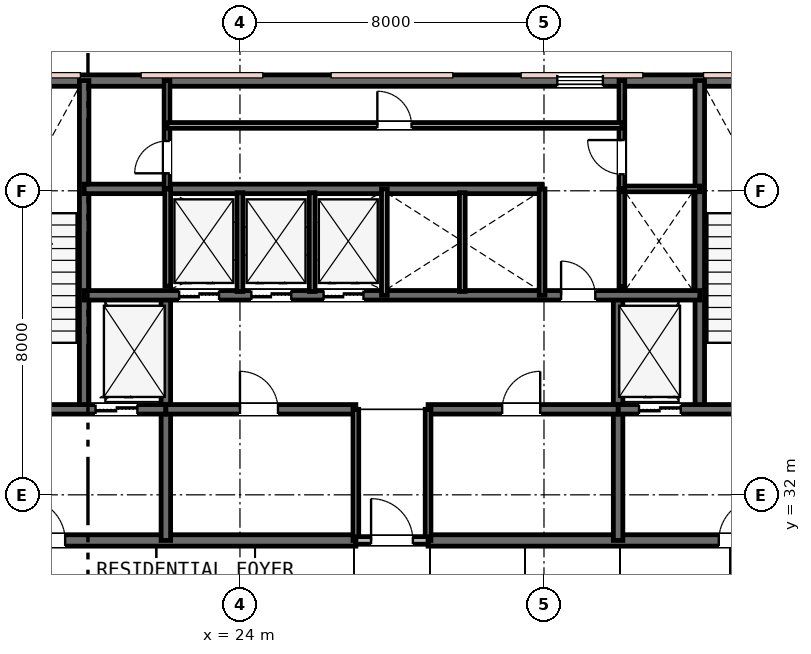
"""IFC4 building model, lengths in metres.
Left out: names, types, materials, properties, quantities, classifications, styles, units other than length and angle.
Written with IfcOpenShell. Run it as: python <this file> out.ifc"""

import sys

from ifc_helpers import new_model, si_unit, direction, frame, frame_2d, origin, place, context, subcontext, project, spatial, rectangle, extrude, element, fill, save


model = new_model("IFC4")
c1 = context("Model", 3, precision=1e-05, world=origin(), true_north=direction((0.0, 1.0)))
c2 = subcontext(c1, "Body", "Model", "MODEL_VIEW")
j1 = project(units=[si_unit("LENGTHUNIT", "METRE"), si_unit("PLANEANGLEUNIT", "RADIAN")], contexts=[c1])
p1 = place(None, origin())
s1 = spatial("IfcSite", under=j1, at=p1, CompositionType="ELEMENT")
p2 = place(p1, origin())
s2 = spatial("IfcBuilding", under=s1, at=p2, CompositionType="ELEMENT")
p3 = place(p2, frame((0.0, 0.0, 267.8)))
s3 = spatial("IfcBuildingStorey", under=s2, at=p3, CompositionType="ELEMENT", Elevation=267.8)
p4 = place(p3, frame((15.85, 42.9, 0.0), z_axis=(0.0, 0.0, 1.0), x_axis=(1.0, 0.0, 0.0)))
e1 = element("IfcWall", 1, at=p4, inside=s3, PredefinedType="SHEAR", context=c2, shape_type="SweptSolid", body=[
    extrude(rectangle(XDim=24.3, YDim=0.3, at=frame_2d((12.15, 0.0))), origin(), (0.0, 0.0, 1.0), 3.8),
])
p5 = place(p4, frame((1.6, 0.0, 0.95)))
e2 = element("IfcOpeningElement", 2, at=p5, cuts=e1, PredefinedType="OPENING", context=c2, shape_type="SweptSolid", body=[
    extrude(rectangle(XDim=1.2, YDim=1.6, at=frame_2d((0.6, 0.8))), frame((0.0, 0.16, 0.0), z_axis=(0.0, -1.0, 0.0), x_axis=(1.0, 0.0, 0.0)), (0.0, 0.0, 1.0), 0.32),
])
p6 = place(p4, frame((16.5, 0.0, 0.95)))
e3 = element("IfcOpeningElement", 3, at=p6, cuts=e1, PredefinedType="OPENING", context=c2, shape_type="SweptSolid", body=[
    extrude(rectangle(XDim=1.2, YDim=1.6, at=frame_2d((0.6, 0.8))), frame((0.0, 0.16, 0.0), z_axis=(0.0, -1.0, 0.0), x_axis=(1.0, 0.0, 0.0)), (0.0, 0.0, 1.0), 0.32),
])
p7 = place(p4, frame((21.6, 0.0, 0.95)))
e4 = element("IfcOpeningElement", 4, at=p7, cuts=e1, PredefinedType="OPENING", context=c2, shape_type="SweptSolid", body=[
    extrude(rectangle(XDim=1.2, YDim=1.6, at=frame_2d((0.6, 0.8))), frame((0.0, 0.16, 0.0), z_axis=(0.0, -1.0, 0.0), x_axis=(1.0, 0.0, 0.0)), (0.0, 0.0, 1.0), 0.32),
])
p8 = place(p3, frame((15.85, 30.8, 0.0), z_axis=(0.0, 0.0, 1.0), x_axis=(1.0, 0.0, 0.0)))
e5 = element("IfcWall", 5, at=p8, inside=s3, PredefinedType="SHEAR", context=c2, shape_type="SweptSolid", body=[
    extrude(rectangle(XDim=11.2, YDim=0.3, at=frame_2d((5.6, 0.0))), origin(), (0.0, 0.0, 1.0), 3.8),
])
p9 = place(p8, frame((2.45, 0.0, 0.0)))
e6 = element("IfcOpeningElement", 6, at=p9, cuts=e5, PredefinedType="OPENING", context=c2, shape_type="SweptSolid", body=[
    extrude(rectangle(XDim=1.1, YDim=2.15, at=frame_2d((0.55, 1.075))), frame((0.0, 0.16, 0.0), z_axis=(0.0, -1.0, 0.0), x_axis=(1.0, 0.0, 0.0)), (0.0, 0.0, 1.0), 0.32),
])
p10 = place(p3, frame((28.95, 30.8, 0.0), z_axis=(0.0, 0.0, 1.0), x_axis=(1.0, 0.0, 0.0)))
e7 = element("IfcWall", 7, at=p10, inside=s3, PredefinedType="SHEAR", context=c2, shape_type="SweptSolid", body=[
    extrude(rectangle(XDim=11.2, YDim=0.3, at=frame_2d((5.6, 0.0))), origin(), (0.0, 0.0, 1.0), 3.8),
])
p11 = place(p10, frame((7.65, 0.0, 0.0)))
e8 = element("IfcOpeningElement", 8, at=p11, cuts=e7, PredefinedType="OPENING", context=c2, shape_type="SweptSolid", body=[
    extrude(rectangle(XDim=1.1, YDim=2.15, at=frame_2d((0.55, 1.075))), frame((0.0, 0.16, 0.0), z_axis=(0.0, -1.0, 0.0), x_axis=(1.0, 0.0, 0.0)), (0.0, 0.0, 1.0), 0.32),
])
for number, where, z_axis, x_axis in (
    (9, (19.9, 34.25, 0.0), (0.0, 0.0, 1.0), (0.0, 1.0, 0.0)),
    (10, (36.1, 34.25, 0.0), (0.0, 0.0, 1.0), (0.0, 1.0, 0.0)),
):
    element("IfcWall", number, at=place(p3, frame(where, z_axis=z_axis, x_axis=x_axis)), inside=s3, PredefinedType="SHEAR", context=c2, shape_type="SweptSolid", body=[
        extrude(rectangle(XDim=8.65, YDim=0.25, at=frame_2d((4.325, 0.0))), origin(), (0.0, 0.0, 1.0), 3.8),
    ])
for number, where, z_axis, x_axis in (
    (11, (22.05, 30.8, 0.0), (0.0, 0.0, 1.0), (0.0, 1.0, 0.0)),
    (12, (33.95, 30.8, 0.0), (0.0, 0.0, 1.0), (0.0, 1.0, 0.0)),
):
    element("IfcWall", number, at=place(p3, frame(where, z_axis=z_axis, x_axis=x_axis)), inside=s3, PredefinedType="SHEAR", context=c2, shape_type="SweptSolid", body=[
        extrude(rectangle(XDim=6.45, YDim=0.25, at=frame_2d((3.225, 0.0))), origin(), (0.0, 0.0, 1.0), 3.8),
    ])
p12 = place(p3, frame((16.0, 34.25, 0.0), z_axis=(0.0, 0.0, 1.0), x_axis=(1.0, 0.0, 0.0)))
e13 = element("IfcWall", 13, at=p12, inside=s3, PredefinedType="SHEAR", context=c2, shape_type="SweptSolid", body=[
    extrude(rectangle(XDim=6.05, YDim=0.25, at=frame_2d((3.025, 0.0))), origin(), (0.0, 0.0, 1.0), 3.8),
])
p13 = place(p12, frame((1.25, 0.0, 0.0)))
e14 = element("IfcOpeningElement", 14, at=p13, cuts=e13, PredefinedType="OPENING", context=c2, shape_type="SweptSolid", body=[
    extrude(rectangle(XDim=1.0, YDim=2.15, at=frame_2d((0.5, 1.075))), frame((0.0, 0.135, 0.0), z_axis=(0.0, -1.0, 0.0), x_axis=(1.0, 0.0, 0.0)), (0.0, 0.0, 1.0), 0.27),
])
p14 = place(p12, frame((4.2, 0.0, 0.0)))
e15 = element("IfcOpeningElement", 15, at=p14, cuts=e13, PredefinedType="OPENING", context=c2, shape_type="SweptSolid", body=[
    extrude(rectangle(XDim=1.1, YDim=2.15, at=frame_2d((0.55, 1.075))), frame((0.0, 0.135, 0.0), z_axis=(0.0, -1.0, 0.0), x_axis=(1.0, 0.0, 0.0)), (0.0, 0.0, 1.0), 0.27),
])
p15 = place(p3, frame((33.95, 34.25, 0.0), z_axis=(0.0, 0.0, 1.0), x_axis=(1.0, 0.0, 0.0)))
e16 = element("IfcWall", 16, at=p15, inside=s3, PredefinedType="SHEAR", context=c2, shape_type="SweptSolid", body=[
    extrude(rectangle(XDim=6.05, YDim=0.25, at=frame_2d((3.025, 0.0))), origin(), (0.0, 0.0, 1.0), 3.8),
])
p16 = place(p15, frame((3.7, 0.0, 0.0)))
e17 = element("IfcOpeningElement", 17, at=p16, cuts=e16, PredefinedType="OPENING", context=c2, shape_type="SweptSolid", body=[
    extrude(rectangle(XDim=1.0, YDim=2.15, at=frame_2d((0.5, 1.075))), frame((0.0, 0.135, 0.0), z_axis=(0.0, -1.0, 0.0), x_axis=(1.0, 0.0, 0.0)), (0.0, 0.0, 1.0), 0.27),
])
p17 = place(p15, frame((0.55, 0.0, 0.0)))
e18 = element("IfcOpeningElement", 18, at=p17, cuts=e16, PredefinedType="OPENING", context=c2, shape_type="SweptSolid", body=[
    extrude(rectangle(XDim=1.1, YDim=2.15, at=frame_2d((0.55, 1.075))), frame((0.0, 0.135, 0.0), z_axis=(0.0, -1.0, 0.0), x_axis=(1.0, 0.0, 0.0)), (0.0, 0.0, 1.0), 0.27),
])
p18 = place(p3, frame((22.05, 34.25, 0.0), z_axis=(0.0, 0.0, 1.0), x_axis=(1.0, 0.0, 0.0)))
e19 = element("IfcWall", 19, at=p18, inside=s3, PredefinedType="SHEAR", context=c2, shape_type="SweptSolid", body=[
    extrude(rectangle(XDim=5.0, YDim=0.25, at=frame_2d((2.5, 0.0))), origin(), (0.0, 0.0, 1.0), 3.8),
])
p19 = place(p18, frame((1.95, 0.0, 0.0)))
e20 = element("IfcOpeningElement", 20, at=p19, cuts=e19, PredefinedType="OPENING", context=c2, shape_type="SweptSolid", body=[
    extrude(rectangle(XDim=1.0, YDim=2.15, at=frame_2d((0.5, 1.075))), frame((0.0, 0.135, 0.0), z_axis=(0.0, -1.0, 0.0), x_axis=(1.0, 0.0, 0.0)), (0.0, 0.0, 1.0), 0.27),
])
p20 = place(p3, frame((28.95, 34.25, 0.0), z_axis=(0.0, 0.0, 1.0), x_axis=(1.0, 0.0, 0.0)))
e21 = element("IfcWall", 21, at=p20, inside=s3, PredefinedType="SHEAR", context=c2, shape_type="SweptSolid", body=[
    extrude(rectangle(XDim=5.0, YDim=0.25, at=frame_2d((2.5, 0.0))), origin(), (0.0, 0.0, 1.0), 3.8),
])
p21 = place(p20, frame((1.95, 0.0, 0.0)))
e22 = element("IfcOpeningElement", 22, at=p21, cuts=e21, PredefinedType="OPENING", context=c2, shape_type="SweptSolid", body=[
    extrude(rectangle(XDim=1.0, YDim=2.15, at=frame_2d((0.5, 1.075))), frame((0.0, 0.135, 0.0), z_axis=(0.0, -1.0, 0.0), x_axis=(1.0, 0.0, 0.0)), (0.0, 0.0, 1.0), 0.27),
])
p22 = place(p3, frame((19.9, 37.25, 0.0), z_axis=(0.0, 0.0, 1.0), x_axis=(1.0, 0.0, 0.0)))
e23 = element("IfcWall", 23, at=p22, inside=s3, PredefinedType="SHEAR", context=c2, shape_type="SweptSolid", body=[
    extrude(rectangle(XDim=16.2, YDim=0.25, at=frame_2d((8.1, 0.0))), origin(), (0.0, 0.0, 1.0), 3.8),
])
p23 = place(p22, frame((12.55, 0.0, 0.0)))
e24 = element("IfcOpeningElement", 24, at=p23, cuts=e23, PredefinedType="OPENING", context=c2, shape_type="SweptSolid", body=[
    extrude(rectangle(XDim=0.9, YDim=2.15, at=frame_2d((0.45, 1.075))), frame((0.0, 0.135, 0.0), z_axis=(0.0, -1.0, 0.0), x_axis=(1.0, 0.0, 0.0)), (0.0, 0.0, 1.0), 0.27),
])
p24 = place(p22, frame((2.5, 0.0, 0.0)))
e25 = element("IfcOpeningElement", 25, at=p24, cuts=e23, PredefinedType="OPENING", context=c2, shape_type="SweptSolid", body=[
    extrude(rectangle(XDim=1.05, YDim=2.15, at=frame_2d((0.525, 1.075))), frame((0.0, 0.135, 0.0), z_axis=(0.0, -1.0, 0.0), x_axis=(1.0, 0.0, 0.0)), (0.0, 0.0, 1.0), 0.27),
])
p25 = place(p22, frame((4.4, 0.0, 0.0)))
e26 = element("IfcOpeningElement", 26, at=p25, cuts=e23, PredefinedType="OPENING", context=c2, shape_type="SweptSolid", body=[
    extrude(rectangle(XDim=1.05, YDim=2.15, at=frame_2d((0.525, 1.075))), frame((0.0, 0.135, 0.0), z_axis=(0.0, -1.0, 0.0), x_axis=(1.0, 0.0, 0.0)), (0.0, 0.0, 1.0), 0.27),
])
p26 = place(p22, frame((6.3, 0.0, 0.0)))
e27 = element("IfcOpeningElement", 27, at=p26, cuts=e23, PredefinedType="OPENING", context=c2, shape_type="SweptSolid", body=[
    extrude(rectangle(XDim=1.05, YDim=2.15, at=frame_2d((0.525, 1.075))), frame((0.0, 0.135, 0.0), z_axis=(0.0, -1.0, 0.0), x_axis=(1.0, 0.0, 0.0)), (0.0, 0.0, 1.0), 0.27),
])
p27 = place(p3, frame((19.9, 40.05, 0.0), z_axis=(0.0, 0.0, 1.0), x_axis=(1.0, 0.0, 0.0)))
e28 = element("IfcWall", 28, at=p27, inside=s3, PredefinedType="SHEAR", context=c2, shape_type="SweptSolid", body=[
    extrude(rectangle(XDim=12.05, YDim=0.25, at=frame_2d((6.025, 0.0))), origin(), (0.0, 0.0, 1.0), 3.8),
])
for number, where, z_axis, x_axis in (
    (29, (27.05, 30.8, 0.0), (0.0, 0.0, 1.0), (0.0, 1.0, 0.0)),
    (30, (28.95, 30.8, 0.0), (0.0, 0.0, 1.0), (0.0, 1.0, 0.0)),
):
    element("IfcWall", number, at=place(p3, frame(where, z_axis=z_axis, x_axis=x_axis)), inside=s3, PredefinedType="PLUMBINGWALL", context=c2, shape_type="SweptSolid", body=[
        extrude(rectangle(XDim=3.45, YDim=0.15, at=frame_2d((1.725, 0.0))), origin(), (0.0, 0.0, 1.0), 3.28),
    ])
p28 = place(p3, frame((27.05, 30.8, 0.0), z_axis=(0.0, 0.0, 1.0), x_axis=(1.0, 0.0, 0.0)))
e31 = element("IfcWall", 31, at=p28, inside=s3, PredefinedType="PARTITIONING", context=c2, shape_type="SweptSolid", body=[
    extrude(rectangle(XDim=1.9, YDim=0.2, at=frame_2d((0.95, 0.0))), origin(), (0.0, 0.0, 1.0), 3.28),
])
p29 = place(p28, frame((0.4, 0.0, 0.0)))
e32 = element("IfcOpeningElement", 32, at=p29, cuts=e31, PredefinedType="OPENING", context=c2, shape_type="SweptSolid", body=[
    extrude(rectangle(XDim=1.1, YDim=2.15, at=frame_2d((0.55, 1.075))), frame((0.0, 0.11, 0.0), z_axis=(0.0, -1.0, 0.0), x_axis=(1.0, 0.0, 0.0)), (0.0, 0.0, 1.0), 0.22),
])
p30 = place(p3, frame((22.1, 37.49, 0.0), z_axis=(0.0, 0.0, 1.0), x_axis=(0.0, 1.0, 0.0)))
e33 = element("IfcWall", 33, at=p30, inside=s3, PredefinedType="PLUMBINGWALL", context=c2, shape_type="SweptSolid", body=[
    extrude(rectangle(XDim=2.56, YDim=0.15, at=frame_2d((1.28, 0.0))), origin(), (0.0, 0.0, 1.0), 3.53),
])
p31 = place(p3, frame((27.8, 37.25, 0.0), z_axis=(0.0, 0.0, 1.0), x_axis=(0.0, 1.0, 0.0)))
e34 = element("IfcWall", 34, at=p31, inside=s3, PredefinedType="PLUMBINGWALL", context=c2, shape_type="SweptSolid", body=[
    extrude(rectangle(XDim=2.8, YDim=0.15, at=frame_2d((1.4, 0.0))), origin(), (0.0, 0.0, 1.0), 3.53),
])
for number, where, z_axis, x_axis in (
    (35, (24.0, 37.35, 0.0), (0.0, 0.0, 1.0), (0.0, 1.0, 0.0)),
    (36, (25.9, 37.35, 0.0), (0.0, 0.0, 1.0), (0.0, 1.0, 0.0)),
):
    element("IfcWall", number, at=place(p3, frame(where, z_axis=z_axis, x_axis=x_axis)), inside=s3, PredefinedType="PLUMBINGWALL", context=c2, shape_type="SweptSolid", body=[
        extrude(rectangle(XDim=2.6, YDim=0.15, at=frame_2d((1.3, 0.0))), origin(), (0.0, 0.0, 1.0), 3.53),
    ])
p32 = place(p3, frame((31.95, 37.25, 0.0), z_axis=(0.0, 0.0, 1.0), x_axis=(0.0, 1.0, 0.0)))
e37 = element("IfcWall", 37, at=p32, inside=s3, PredefinedType="PLUMBINGWALL", context=c2, shape_type="SweptSolid", body=[
    extrude(rectangle(XDim=2.8, YDim=0.15, at=frame_2d((1.4, 0.0))), origin(), (0.0, 0.0, 1.0), 3.53),
])
p33 = place(p3, frame((29.85, 37.35, 0.0), z_axis=(0.0, 0.0, 1.0), x_axis=(0.0, 1.0, 0.0)))
e38 = element("IfcWall", 38, at=p33, inside=s3, PredefinedType="PLUMBINGWALL", context=c2, shape_type="SweptSolid", body=[
    extrude(rectangle(XDim=2.6, YDim=0.15, at=frame_2d((1.3, 0.0))), origin(), (0.0, 0.0, 1.0), 3.53),
])
p34 = place(p3, frame((34.05, 37.473, 0.0), z_axis=(0.0, 0.0, 1.0), x_axis=(0.0, 1.0, 0.0)))
e39 = element("IfcWall", 39, at=p34, inside=s3, PredefinedType="PLUMBINGWALL", context=c2, shape_type="SweptSolid", body=[
    extrude(rectangle(XDim=2.577, YDim=0.15, at=frame_2d((1.288, 0.0))), origin(), (0.0, 0.0, 1.0), 3.53),
])
p35 = place(p3, frame((34.05, 40.05, 0.0), z_axis=(0.0, 0.0, 1.0), x_axis=(1.0, 0.0, 0.0)))
e40 = element("IfcWall", 40, at=p35, inside=s3, PredefinedType="PARTITIONING", context=c2, shape_type="SweptSolid", body=[
    extrude(rectangle(XDim=2.05, YDim=0.15, at=frame_2d((1.025, 0.0))), origin(), (0.0, 0.0, 1.0), 3.53),
])
p36 = place(p3, frame((34.05, 40.05, 0.0), z_axis=(0.0, 0.0, 1.0), x_axis=(0.0, 1.0, 0.0)))
e41 = element("IfcWall", 41, at=p36, inside=s3, PredefinedType="PARTITIONING", context=c2, shape_type="SweptSolid", body=[
    extrude(rectangle(XDim=2.85, YDim=0.15, at=frame_2d((1.425, 0.0))), origin(), (0.0, 0.0, 1.0), 3.53),
])
p37 = place(p36, frame((0.385, 0.0, 0.0)))
e42 = element("IfcOpeningElement", 42, at=p37, cuts=e41, PredefinedType="OPENING", context=c2, shape_type="SweptSolid", body=[
    extrude(rectangle(XDim=0.9, YDim=2.15, at=frame_2d((0.45, 1.075))), frame((0.0, 0.085, 0.0), z_axis=(0.0, -1.0, 0.0), x_axis=(1.0, 0.0, 0.0)), (0.0, 0.0, 1.0), 0.17),
])
p38 = place(p3, frame((22.08, 40.05, 0.0), z_axis=(0.0, 0.0, 1.0), x_axis=(0.0, 1.0, 0.0)))
e43 = element("IfcWall", 43, at=p38, inside=s3, PredefinedType="PARTITIONING", context=c2, shape_type="SweptSolid", body=[
    extrude(rectangle(XDim=2.85, YDim=0.15, at=frame_2d((1.425, 0.0))), origin(), (0.0, 0.0, 1.0), 3.53),
])
p39 = place(p38, frame((0.41, 0.0, 0.0)))
e44 = element("IfcOpeningElement", 44, at=p39, cuts=e43, PredefinedType="OPENING", context=c2, shape_type="SweptSolid", body=[
    extrude(rectangle(XDim=0.85, YDim=2.15, at=frame_2d((0.425, 1.075))), frame((0.0, 0.085, 0.0), z_axis=(0.0, -1.0, 0.0), x_axis=(1.0, 0.0, 0.0)), (0.0, 0.0, 1.0), 0.17),
])
p40 = place(p3, frame((22.08, 41.72, 0.0), z_axis=(0.0, 0.0, 1.0), x_axis=(1.0, 0.0, 0.0)))
e45 = element("IfcWall", 45, at=p40, inside=s3, PredefinedType="PARTITIONING", context=c2, shape_type="SweptSolid", body=[
    extrude(rectangle(XDim=11.97, YDim=0.15, at=frame_2d((5.985, 0.0))), origin(), (0.0, 0.0, 1.0), 3.53),
])
p41 = place(p40, frame((5.535, 0.0, 0.0)))
e46 = element("IfcOpeningElement", 46, at=p41, cuts=e45, PredefinedType="OPENING", context=c2, shape_type="SweptSolid", body=[
    extrude(rectangle(XDim=0.9, YDim=2.15, at=frame_2d((0.45, 1.075))), frame((0.0, 0.085, 0.0), z_axis=(0.0, -1.0, 0.0), x_axis=(1.0, 0.0, 0.0)), (0.0, 0.0, 1.0), 0.17),
])
p42 = place(p6, origin())
e47 = element("IfcWindow", 47, at=p42, inside=s3, PartitioningType="SINGLE_PANEL", PredefinedType="WINDOW", context=c2, shape_type="SweptSolid", body=[
    extrude(rectangle(XDim=1.2, YDim=1.6, at=frame_2d((0.6, 0.8))), frame((0.0, 0.03, 0.0), z_axis=(0.0, -1.0, 0.0), x_axis=(1.0, 0.0, 0.0)), (0.0, 0.0, 1.0), 0.06),
])
fill(e3, e47)
p43 = place(p29, origin())
e48 = element("IfcDoor", 48, at=p43, inside=s3, OperationType="SINGLE_SWING_LEFT", PredefinedType="DOOR", context=c2, shape_type="SweptSolid", body=[
    extrude(rectangle(XDim=1.1, YDim=2.15, at=frame_2d((0.55, 1.075))), frame((0.0, 0.025, 0.0), z_axis=(0.0, -1.0, 0.0), x_axis=(1.0, 0.0, 0.0)), (0.0, 0.0, 1.0), 0.05),
])
fill(e32, e48)
p44 = place(p9, origin())
e49 = element("IfcDoor", 49, at=p44, inside=s3, OperationType="SINGLE_SWING_LEFT", PredefinedType="DOOR", context=c2, shape_type="SweptSolid", body=[
    extrude(rectangle(XDim=1.1, YDim=2.15, at=frame_2d((0.55, 1.075))), frame((0.0, 0.025, 0.0), z_axis=(0.0, -1.0, 0.0), x_axis=(1.0, 0.0, 0.0)), (0.0, 0.0, 1.0), 0.05),
])
fill(e6, e49)
p45 = place(p11, origin())
e50 = element("IfcDoor", 50, at=p45, inside=s3, OperationType="SINGLE_SWING_RIGHT", PredefinedType="DOOR", context=c2, shape_type="SweptSolid", body=[
    extrude(rectangle(XDim=1.1, YDim=2.15, at=frame_2d((0.55, 1.075))), frame((0.0, 0.025, 0.0), z_axis=(0.0, -1.0, 0.0), x_axis=(1.0, 0.0, 0.0)), (0.0, 0.0, 1.0), 0.05),
])
fill(e8, e50)
p46 = place(p19, origin())
e51 = element("IfcDoor", 51, at=p46, inside=s3, OperationType="SINGLE_SWING_LEFT", PredefinedType="DOOR", context=c2, shape_type="SweptSolid", body=[
    extrude(rectangle(XDim=1.0, YDim=2.15, at=frame_2d((0.5, 1.075))), frame((0.0, 0.025, 0.0), z_axis=(0.0, -1.0, 0.0), x_axis=(1.0, 0.0, 0.0)), (0.0, 0.0, 1.0), 0.05),
])
fill(e20, e51)
p47 = place(p21, origin())
e52 = element("IfcDoor", 52, at=p47, inside=s3, OperationType="SINGLE_SWING_RIGHT", PredefinedType="DOOR", context=c2, shape_type="SweptSolid", body=[
    extrude(rectangle(XDim=1.0, YDim=2.15, at=frame_2d((0.5, 1.075))), frame((0.0, 0.025, 0.0), z_axis=(0.0, -1.0, 0.0), x_axis=(1.0, 0.0, 0.0)), (0.0, 0.0, 1.0), 0.05),
])
fill(e22, e52)
p48 = place(p23, origin())
e53 = element("IfcDoor", 53, at=p48, inside=s3, OperationType="SINGLE_SWING_LEFT", PredefinedType="DOOR", context=c2, shape_type="SweptSolid", body=[
    extrude(rectangle(XDim=0.9, YDim=2.15, at=frame_2d((0.45, 1.075))), frame((0.0, 0.025, 0.0), z_axis=(0.0, -1.0, 0.0), x_axis=(1.0, 0.0, 0.0)), (0.0, 0.0, 1.0), 0.05),
])
fill(e24, e53)
p49 = place(p37, origin())
e54 = element("IfcDoor", 54, at=p49, inside=s3, OperationType="SINGLE_SWING_RIGHT", PredefinedType="DOOR", context=c2, shape_type="SweptSolid", body=[
    extrude(rectangle(XDim=0.9, YDim=2.15, at=frame_2d((0.45, 1.075))), frame((0.0, 0.025, 0.0), z_axis=(0.0, -1.0, 0.0), x_axis=(1.0, 0.0, 0.0)), (0.0, 0.0, 1.0), 0.05),
])
fill(e42, e54)
p50 = place(p39, origin())
e55 = element("IfcDoor", 55, at=p50, inside=s3, OperationType="SINGLE_SWING_LEFT", PredefinedType="DOOR", context=c2, shape_type="SweptSolid", body=[
    extrude(rectangle(XDim=0.85, YDim=2.15, at=frame_2d((0.425, 1.075))), frame((0.0, 0.025, 0.0), z_axis=(0.0, -1.0, 0.0), x_axis=(1.0, 0.0, 0.0)), (0.0, 0.0, 1.0), 0.05),
])
fill(e44, e55)
p51 = place(p41, origin())
e56 = element("IfcDoor", 56, at=p51, inside=s3, OperationType="SINGLE_SWING_LEFT", PredefinedType="DOOR", context=c2, shape_type="SweptSolid", body=[
    extrude(rectangle(XDim=0.9, YDim=2.15, at=frame_2d((0.45, 1.075))), frame((0.0, 0.025, 0.0), z_axis=(0.0, -1.0, 0.0), x_axis=(1.0, 0.0, 0.0)), (0.0, 0.0, 1.0), 0.05),
])
fill(e46, e56)
p52 = place(p14, origin())
e57 = element("IfcDoor", 57, at=p52, inside=s3, OperationType="DOUBLE_DOOR_SLIDING", PredefinedType="DOOR", context=c2, shape_type="SweptSolid", body=[
    extrude(rectangle(XDim=1.1, YDim=2.15, at=frame_2d((0.55, 1.075))), frame((0.0, 0.025, 0.0), z_axis=(0.0, -1.0, 0.0), x_axis=(1.0, 0.0, 0.0)), (0.0, 0.0, 1.0), 0.05),
])
fill(e15, e57)
p53 = place(p17, origin())
e58 = element("IfcDoor", 58, at=p53, inside=s3, OperationType="DOUBLE_DOOR_SLIDING", PredefinedType="DOOR", context=c2, shape_type="SweptSolid", body=[
    extrude(rectangle(XDim=1.1, YDim=2.15, at=frame_2d((0.55, 1.075))), frame((0.0, 0.025, 0.0), z_axis=(0.0, -1.0, 0.0), x_axis=(1.0, 0.0, 0.0)), (0.0, 0.0, 1.0), 0.05),
])
fill(e18, e58)
p54 = place(p24, origin())
e59 = element("IfcDoor", 59, at=p54, inside=s3, OperationType="DOUBLE_DOOR_SLIDING", PredefinedType="DOOR", context=c2, shape_type="SweptSolid", body=[
    extrude(rectangle(XDim=1.05, YDim=2.15, at=frame_2d((0.525, 1.075))), frame((0.0, 0.025, 0.0), z_axis=(0.0, -1.0, 0.0), x_axis=(1.0, 0.0, 0.0)), (0.0, 0.0, 1.0), 0.05),
])
fill(e25, e59)
p55 = place(p25, origin())
e60 = element("IfcDoor", 60, at=p55, inside=s3, OperationType="DOUBLE_DOOR_SLIDING", PredefinedType="DOOR", context=c2, shape_type="SweptSolid", body=[
    extrude(rectangle(XDim=1.05, YDim=2.15, at=frame_2d((0.525, 1.075))), frame((0.0, 0.025, 0.0), z_axis=(0.0, -1.0, 0.0), x_axis=(1.0, 0.0, 0.0)), (0.0, 0.0, 1.0), 0.05),
])
fill(e26, e60)
p56 = place(p26, origin())
e61 = element("IfcDoor", 61, at=p56, inside=s3, OperationType="DOUBLE_DOOR_SLIDING", PredefinedType="DOOR", context=c2, shape_type="SweptSolid", body=[
    extrude(rectangle(XDim=1.05, YDim=2.15, at=frame_2d((0.525, 1.075))), frame((0.0, 0.025, 0.0), z_axis=(0.0, -1.0, 0.0), x_axis=(1.0, 0.0, 0.0)), (0.0, 0.0, 1.0), 0.05),
])
fill(e27, e61)
save(model, sys.argv[1])
